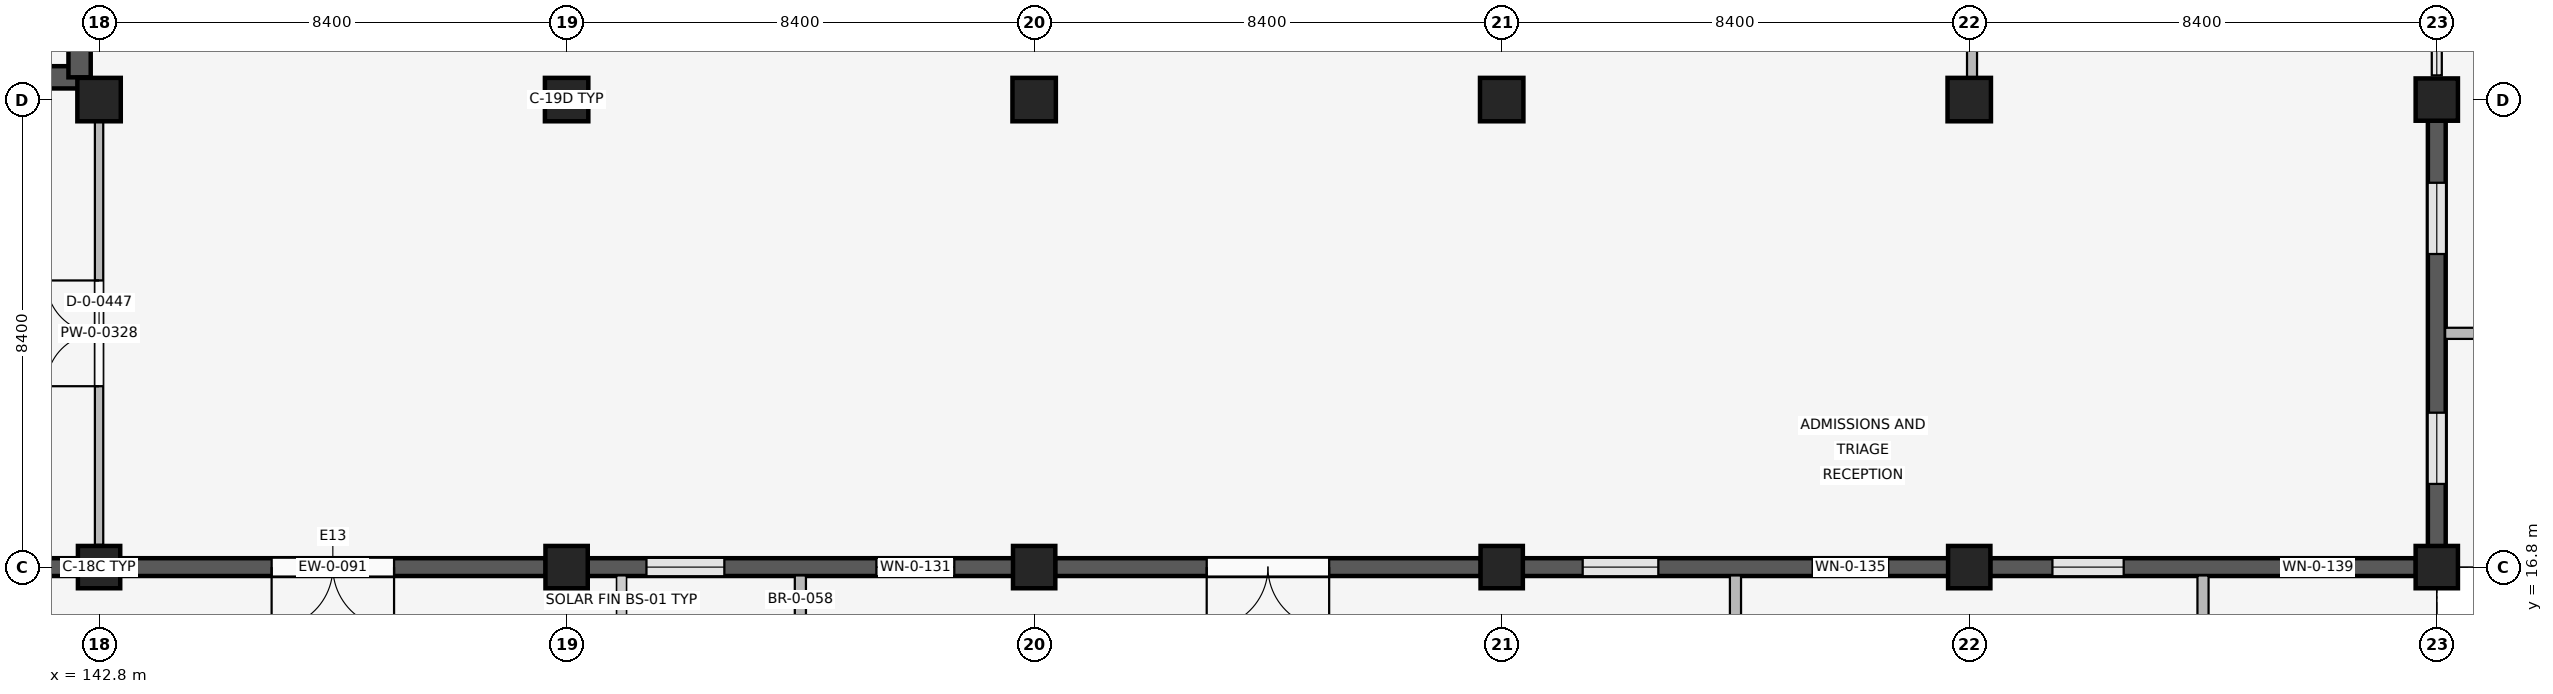
"""IFC4 building model, lengths in metres.
Left out: names, types, materials, properties, quantities, classifications, styles, units other than length and angle.
Written with IfcOpenShell. Run it as: python <this file> out.ifc"""

import sys

from ifc_helpers import new_model, si_unit, direction, frame, frame_2d, origin, origin_2d, place, context, subcontext, project, spatial, rectangle, extrude, element, fill, save


model = new_model("IFC4")
c1 = context("Model", 3, precision=1e-05, world=origin(), true_north=direction((0.0, 1.0)))
c2 = subcontext(c1, "Body", "Model", "MODEL_VIEW")
j1 = project(units=[si_unit("LENGTHUNIT", "METRE"), si_unit("PLANEANGLEUNIT", "RADIAN")], contexts=[c1])
p1 = place(None, origin())
s1 = spatial("IfcSite", under=j1, at=p1, CompositionType="ELEMENT")
p2 = place(p1, origin())
s2 = spatial("IfcBuilding", under=s1, at=p2, CompositionType="ELEMENT")
p3 = place(p2, origin())
s3 = spatial("IfcBuildingStorey", under=s2, at=p3, CompositionType="ELEMENT", Elevation=0.0)
p4 = place(p3, frame((142.8, 16.8, 0.0), z_axis=(0.0, 0.0, 1.0), x_axis=(1.0, 0.0, 0.0)))
e1 = element("IfcColumn", 1, at=p4, inside=s3, PredefinedType="COLUMN", context=c2, shape_type="SweptSolid", body=[
    extrude(rectangle(XDim=0.76, YDim=0.76, at=origin_2d()), origin(), (0.0, 0.0, 1.0), 4.8),
])
p5 = place(p3, frame((142.8, 25.2, 0.0), z_axis=(0.0, 0.0, 1.0), x_axis=(1.0, 0.0, 0.0)))
e2 = element("IfcColumn", 2, at=p5, inside=s3, PredefinedType="COLUMN", context=c2, shape_type="SweptSolid", body=[
    extrude(rectangle(XDim=0.78, YDim=0.78, at=origin_2d()), origin(), (0.0, 0.0, 1.0), 4.8),
])
p6 = place(p3, frame((151.2, 16.8, 0.0), z_axis=(0.0, 0.0, 1.0), x_axis=(1.0, 0.0, 0.0)))
e3 = element("IfcColumn", 3, at=p6, inside=s3, PredefinedType="COLUMN", context=c2, shape_type="SweptSolid", body=[
    extrude(rectangle(XDim=0.76, YDim=0.76, at=origin_2d()), origin(), (0.0, 0.0, 1.0), 4.8),
])
p7 = place(p3, frame((151.2, 25.2, 0.0), z_axis=(0.0, 0.0, 1.0), x_axis=(1.0, 0.0, 0.0)))
e4 = element("IfcColumn", 4, at=p7, inside=s3, PredefinedType="COLUMN", context=c2, shape_type="SweptSolid", body=[
    extrude(rectangle(XDim=0.78, YDim=0.78, at=origin_2d()), origin(), (0.0, 0.0, 1.0), 4.8),
])
p8 = place(p3, frame((159.6, 16.8, 0.0), z_axis=(0.0, 0.0, 1.0), x_axis=(1.0, 0.0, 0.0)))
e5 = element("IfcColumn", 5, at=p8, inside=s3, PredefinedType="COLUMN", context=c2, shape_type="SweptSolid", body=[
    extrude(rectangle(XDim=0.76, YDim=0.76, at=origin_2d()), origin(), (0.0, 0.0, 1.0), 4.8),
])
p9 = place(p3, frame((159.6, 25.2, 0.0), z_axis=(0.0, 0.0, 1.0), x_axis=(1.0, 0.0, 0.0)))
e6 = element("IfcColumn", 6, at=p9, inside=s3, PredefinedType="COLUMN", context=c2, shape_type="SweptSolid", body=[
    extrude(rectangle(XDim=0.78, YDim=0.78, at=origin_2d()), origin(), (0.0, 0.0, 1.0), 4.8),
])
p10 = place(p3, frame((168.0, 16.8, 0.0), z_axis=(0.0, 0.0, 1.0), x_axis=(1.0, 0.0, 0.0)))
e7 = element("IfcColumn", 7, at=p10, inside=s3, PredefinedType="COLUMN", context=c2, shape_type="SweptSolid", body=[
    extrude(rectangle(XDim=0.76, YDim=0.76, at=origin_2d()), origin(), (0.0, 0.0, 1.0), 4.8),
])
p11 = place(p3, frame((168.0, 25.2, 0.0), z_axis=(0.0, 0.0, 1.0), x_axis=(1.0, 0.0, 0.0)))
e8 = element("IfcColumn", 8, at=p11, inside=s3, PredefinedType="COLUMN", context=c2, shape_type="SweptSolid", body=[
    extrude(rectangle(XDim=0.78, YDim=0.78, at=origin_2d()), origin(), (0.0, 0.0, 1.0), 4.8),
])
p12 = place(p3, frame((176.4, 16.8, 0.0), z_axis=(0.0, 0.0, 1.0), x_axis=(1.0, 0.0, 0.0)))
e9 = element("IfcColumn", 9, at=p12, inside=s3, PredefinedType="COLUMN", context=c2, shape_type="SweptSolid", body=[
    extrude(rectangle(XDim=0.76, YDim=0.76, at=origin_2d()), origin(), (0.0, 0.0, 1.0), 4.8),
])
p13 = place(p3, frame((176.4, 25.2, 0.0), z_axis=(0.0, 0.0, 1.0), x_axis=(1.0, 0.0, 0.0)))
e10 = element("IfcColumn", 10, at=p13, inside=s3, PredefinedType="COLUMN", context=c2, shape_type="SweptSolid", body=[
    extrude(rectangle(XDim=0.78, YDim=0.78, at=origin_2d()), origin(), (0.0, 0.0, 1.0), 4.8),
])
for number, where, z_axis, x_axis in (
    (11, (184.8, 16.8, 0.0), (0.0, 0.0, 1.0), (1.0, 0.0, 0.0)),
    (12, (184.8, 25.2, 0.0), (0.0, 0.0, 1.0), (1.0, 0.0, 0.0)),
):
    element("IfcColumn", number, at=place(p3, frame(where, z_axis=z_axis, x_axis=x_axis)), inside=s3, PredefinedType="COLUMN", context=c2, shape_type="SweptSolid", body=[
        extrude(rectangle(XDim=0.76, YDim=0.76, at=origin_2d()), origin(), (0.0, 0.0, 1.0), 4.8),
    ])
p14 = place(p3, frame((142.425, 16.8, 0.0), z_axis=(0.0, 0.0, 1.0), x_axis=(-1.0, 0.0, 0.0)))
e13 = element("IfcWall", 13, at=p14, inside=s3, PredefinedType="SOLIDWALL", context=c2, shape_type="SweptSolid", body=[
    extrude(rectangle(XDim=7.65, YDim=0.32, at=frame_2d((3.825, 0.0))), origin(), (0.0, 0.0, 1.0), 3.82),
])
p15 = place(p14, frame((6.0, 0.0, 0.0)))
e14 = element("IfcOpeningElement", 14, at=p15, cuts=e13, PredefinedType="OPENING", context=c2, shape_type="SweptSolid", body=[
    extrude(rectangle(XDim=1.2, YDim=2.25, at=frame_2d((0.6, 1.125))), frame((0.0, 0.17, 0.0), z_axis=(0.0, -1.0, 0.0), x_axis=(1.0, 0.0, 0.0)), (0.0, 0.0, 1.0), 0.34),
])
p16 = place(p14, frame((1.129, 0.0, 0.85)))
e15 = element("IfcOpeningElement", 15, at=p16, cuts=e13, PredefinedType="OPENING", context=c2, shape_type="SweptSolid", body=[
    extrude(rectangle(XDim=1.26, YDim=1.52, at=frame_2d((0.63, 0.76))), frame((0.0, 0.17, 0.0), z_axis=(0.0, -1.0, 0.0), x_axis=(1.0, 0.0, 0.0)), (0.0, 0.0, 1.0), 0.34),
])
p17 = place(p14, frame((4.3, 0.0, 0.85)))
e16 = element("IfcOpeningElement", 16, at=p17, cuts=e13, PredefinedType="OPENING", context=c2, shape_type="SweptSolid", body=[
    extrude(rectangle(XDim=1.26, YDim=1.52, at=frame_2d((0.63, 0.76))), frame((0.0, 0.17, 0.0), z_axis=(0.0, -1.0, 0.0), x_axis=(1.0, 0.0, 0.0)), (0.0, 0.0, 1.0), 0.34),
])
p18 = place(p3, frame((150.825, 16.8, 0.0), z_axis=(0.0, 0.0, 1.0), x_axis=(-1.0, 0.0, 0.0)))
e17 = element("IfcWall", 17, at=p18, inside=s3, PredefinedType="SOLIDWALL", context=c2, shape_type="SweptSolid", body=[
    extrude(rectangle(XDim=7.65, YDim=0.32, at=frame_2d((3.825, 0.0))), origin(), (0.0, 0.0, 1.0), 3.82),
])
p19 = place(p18, frame((2.725, 0.0, 0.0)))
e18 = element("IfcOpeningElement", 18, at=p19, cuts=e17, PredefinedType="OPENING", context=c2, shape_type="SweptSolid", body=[
    extrude(rectangle(XDim=2.2, YDim=2.55, at=frame_2d((1.1, 1.275))), frame((0.0, 0.17, 0.0), z_axis=(0.0, -1.0, 0.0), x_axis=(1.0, 0.0, 0.0)), (0.0, 0.0, 1.0), 0.34),
])
p20 = place(p3, frame((159.225, 16.8, 0.0), z_axis=(0.0, 0.0, 1.0), x_axis=(-1.0, 0.0, 0.0)))
e19 = element("IfcWall", 19, at=p20, inside=s3, PredefinedType="SOLIDWALL", context=c2, shape_type="SweptSolid", body=[
    extrude(rectangle(XDim=7.65, YDim=0.32, at=frame_2d((3.825, 0.0))), origin(), (0.0, 0.0, 1.0), 3.82),
])
p21 = place(p20, frame((1.06, 0.0, 0.85)))
e20 = element("IfcOpeningElement", 20, at=p21, cuts=e19, PredefinedType="OPENING", context=c2, shape_type="SweptSolid", body=[
    extrude(rectangle(XDim=1.4, YDim=1.4, at=frame_2d((0.7, 0.7))), frame((0.0, 0.17, 0.0), z_axis=(0.0, -1.0, 0.0), x_axis=(1.0, 0.0, 0.0)), (0.0, 0.0, 1.0), 0.34),
])
p22 = place(p20, frame((5.19, 0.0, 0.85)))
e21 = element("IfcOpeningElement", 21, at=p22, cuts=e19, PredefinedType="OPENING", context=c2, shape_type="SweptSolid", body=[
    extrude(rectangle(XDim=1.4, YDim=1.4, at=frame_2d((0.7, 0.7))), frame((0.0, 0.17, 0.0), z_axis=(0.0, -1.0, 0.0), x_axis=(1.0, 0.0, 0.0)), (0.0, 0.0, 1.0), 0.34),
])
p23 = place(p3, frame((155.4, 16.65, 0.0), z_axis=(0.0, 0.0, 1.0), x_axis=(0.0, -1.0, 0.0)))
e22 = element("IfcWall", 22, at=p23, inside=s3, PredefinedType="ELEMENTEDWALL", context=c2, shape_type="SweptSolid", body=[
    extrude(rectangle(XDim=0.85, YDim=0.2, at=frame_2d((0.425, 0.0))), origin(), (0.0, 0.0, 1.0), 3.8),
])
p24 = place(p3, frame((167.625, 16.8, 0.0), z_axis=(0.0, 0.0, 1.0), x_axis=(-1.0, 0.0, 0.0)))
e23 = element("IfcWall", 23, at=p24, inside=s3, PredefinedType="SOLIDWALL", context=c2, shape_type="SweptSolid", body=[
    extrude(rectangle(XDim=7.65, YDim=0.32, at=frame_2d((3.825, 0.0))), origin(), (0.0, 0.0, 1.0), 3.82),
])
p25 = place(p24, frame((2.725, 0.0, 0.0)))
e24 = element("IfcOpeningElement", 24, at=p25, cuts=e23, PredefinedType="OPENING", context=c2, shape_type="SweptSolid", body=[
    extrude(rectangle(XDim=2.2, YDim=2.55, at=frame_2d((1.1, 1.275))), frame((0.0, 0.17, 0.0), z_axis=(0.0, -1.0, 0.0), x_axis=(1.0, 0.0, 0.0)), (0.0, 0.0, 1.0), 0.34),
])
p26 = place(p3, frame((176.025, 16.8, 0.0), z_axis=(0.0, 0.0, 1.0), x_axis=(-1.0, 0.0, 0.0)))
e25 = element("IfcWall", 25, at=p26, inside=s3, PredefinedType="SOLIDWALL", context=c2, shape_type="SweptSolid", body=[
    extrude(rectangle(XDim=7.65, YDim=0.32, at=frame_2d((3.825, 0.0))), origin(), (0.0, 0.0, 1.0), 3.82),
])
p27 = place(p26, frame((1.08, 0.0, 0.85)))
e26 = element("IfcOpeningElement", 26, at=p27, cuts=e25, PredefinedType="OPENING", context=c2, shape_type="SweptSolid", body=[
    extrude(rectangle(XDim=1.36, YDim=1.42, at=frame_2d((0.68, 0.71))), frame((0.0, 0.17, 0.0), z_axis=(0.0, -1.0, 0.0), x_axis=(1.0, 0.0, 0.0)), (0.0, 0.0, 1.0), 0.34),
])
p28 = place(p26, frame((5.21, 0.0, 0.85)))
e27 = element("IfcOpeningElement", 27, at=p28, cuts=e25, PredefinedType="OPENING", context=c2, shape_type="SweptSolid", body=[
    extrude(rectangle(XDim=1.36, YDim=1.42, at=frame_2d((0.68, 0.71))), frame((0.0, 0.17, 0.0), z_axis=(0.0, -1.0, 0.0), x_axis=(1.0, 0.0, 0.0)), (0.0, 0.0, 1.0), 0.34),
])
p29 = place(p3, frame((172.2, 16.65, 0.0), z_axis=(0.0, 0.0, 1.0), x_axis=(0.0, -1.0, 0.0)))
e28 = element("IfcWall", 28, at=p29, inside=s3, PredefinedType="ELEMENTEDWALL", context=c2, shape_type="SweptSolid", body=[
    extrude(rectangle(XDim=0.85, YDim=0.2, at=frame_2d((0.425, 0.0))), origin(), (0.0, 0.0, 1.0), 3.8),
])
p30 = place(p3, frame((184.425, 16.8, 0.0), z_axis=(0.0, 0.0, 1.0), x_axis=(-1.0, 0.0, 0.0)))
e29 = element("IfcWall", 29, at=p30, inside=s3, PredefinedType="SOLIDWALL", context=c2, shape_type="SweptSolid", body=[
    extrude(rectangle(XDim=7.65, YDim=0.32, at=frame_2d((3.825, 0.0))), origin(), (0.0, 0.0, 1.0), 3.82),
])
p31 = place(p30, frame((1.119, 0.0, 0.85)))
e30 = element("IfcOpeningElement", 30, at=p31, cuts=e29, PredefinedType="OPENING", context=c2, shape_type="SweptSolid", body=[
    extrude(rectangle(XDim=1.28, YDim=1.38, at=frame_2d((0.64, 0.69))), frame((0.0, 0.17, 0.0), z_axis=(0.0, -1.0, 0.0), x_axis=(1.0, 0.0, 0.0)), (0.0, 0.0, 1.0), 0.34),
])
p32 = place(p30, frame((5.25, 0.0, 0.85)))
e31 = element("IfcOpeningElement", 31, at=p32, cuts=e29, PredefinedType="OPENING", context=c2, shape_type="SweptSolid", body=[
    extrude(rectangle(XDim=1.28, YDim=1.38, at=frame_2d((0.64, 0.69))), frame((0.0, 0.17, 0.0), z_axis=(0.0, -1.0, 0.0), x_axis=(1.0, 0.0, 0.0)), (0.0, 0.0, 1.0), 0.34),
])
p33 = place(p3, frame((180.6, 16.65, 0.0), z_axis=(0.0, 0.0, 1.0), x_axis=(0.0, -1.0, 0.0)))
e32 = element("IfcWall", 32, at=p33, inside=s3, PredefinedType="ELEMENTEDWALL", context=c2, shape_type="SweptSolid", body=[
    extrude(rectangle(XDim=0.85, YDim=0.2, at=frame_2d((0.425, 0.0))), origin(), (0.0, 0.0, 1.0), 3.8),
])
p34 = place(p3, frame((184.8, 24.825, 0.0), z_axis=(0.0, 0.0, 1.0), x_axis=(0.0, -1.0, 0.0)))
e33 = element("IfcWall", 33, at=p34, inside=s3, PredefinedType="SOLIDWALL", context=c2, shape_type="SweptSolid", body=[
    extrude(rectangle(XDim=7.65, YDim=0.32, at=frame_2d((3.825, 0.0))), origin(), (0.0, 0.0, 1.0), 3.82),
])
p35 = place(p34, frame((1.119, 0.0, 0.85)))
e34 = element("IfcOpeningElement", 34, at=p35, cuts=e33, PredefinedType="OPENING", context=c2, shape_type="SweptSolid", body=[
    extrude(rectangle(XDim=1.28, YDim=1.38, at=frame_2d((0.64, 0.69))), frame((0.0, 0.17, 0.0), z_axis=(0.0, -1.0, 0.0), x_axis=(1.0, 0.0, 0.0)), (0.0, 0.0, 1.0), 0.34),
])
p36 = place(p34, frame((5.25, 0.0, 0.85)))
e35 = element("IfcOpeningElement", 35, at=p36, cuts=e33, PredefinedType="OPENING", context=c2, shape_type="SweptSolid", body=[
    extrude(rectangle(XDim=1.28, YDim=1.38, at=frame_2d((0.64, 0.69))), frame((0.0, 0.17, 0.0), z_axis=(0.0, -1.0, 0.0), x_axis=(1.0, 0.0, 0.0)), (0.0, 0.0, 1.0), 0.34),
])
p37 = place(p3, frame((184.95, 21.0, 0.0), z_axis=(0.0, 0.0, 1.0), x_axis=(1.0, 0.0, 0.0)))
e36 = element("IfcWall", 36, at=p37, inside=s3, PredefinedType="ELEMENTEDWALL", context=c2, shape_type="SweptSolid", body=[
    extrude(rectangle(XDim=0.85, YDim=0.2, at=frame_2d((0.425, 0.0))), origin(), (0.0, 0.0, 1.0), 3.8),
])
p38 = place(p3, frame((134.95, 25.6, 0.0), z_axis=(0.0, 0.0, 1.0), x_axis=(1.0, 0.0, 0.0)))
e37 = element("IfcWall", 37, at=p38, inside=s3, PredefinedType="SHEAR", context=c2, shape_type="SweptSolid", body=[
    extrude(rectangle(XDim=7.5, YDim=0.4, at=frame_2d((3.75, 0.0))), origin(), (0.0, 0.0, 1.0), 4.52),
])
p39 = place(p38, frame((4.85, 0.0, 0.0)))
e38 = element("IfcOpeningElement", 38, at=p39, cuts=e37, PredefinedType="OPENING", context=c2, shape_type="SweptSolid", body=[
    extrude(rectangle(XDim=1.2, YDim=2.2, at=frame_2d((0.6, 1.1))), frame((0.0, 0.21, 0.0), z_axis=(0.0, -1.0, 0.0), x_axis=(1.0, 0.0, 0.0)), (0.0, 0.0, 1.0), 0.42),
])
p40 = place(p38, frame((0.22, 0.0, 0.0)))
e39 = element("IfcOpeningElement", 39, at=p40, cuts=e37, PredefinedType="OPENING", context=c2, shape_type="SweptSolid", body=[
    extrude(rectangle(XDim=1.2, YDim=2.2, at=frame_2d((0.6, 1.1))), frame((0.0, 0.21, 0.0), z_axis=(0.0, -1.0, 0.0), x_axis=(1.0, 0.0, 0.0)), (0.0, 0.0, 1.0), 0.42),
])
p41 = place(p3, frame((142.45, 25.6, 0.0), z_axis=(0.0, 0.0, 1.0), x_axis=(0.0, 1.0, 0.0)))
e40 = element("IfcWall", 40, at=p41, inside=s3, PredefinedType="SHEAR", context=c2, shape_type="SweptSolid", body=[
    extrude(rectangle(XDim=7.55, YDim=0.4, at=frame_2d((3.775, 0.0))), origin(), (0.0, 0.0, 1.0), 4.52),
])
p42 = place(p3, frame((142.8, 17.2, 0.0), z_axis=(0.0, 0.0, 1.0), x_axis=(0.0, 1.0, 0.0)))
e41 = element("IfcWall", 41, at=p42, inside=s3, PredefinedType="PARTITIONING", context=c2, shape_type="SweptSolid", body=[
    extrude(rectangle(XDim=7.6, YDim=0.15, at=frame_2d((3.8, 0.0))), origin(), (0.0, 0.0, 1.0), 3.8),
])
p43 = place(p42, frame((2.85, 0.0, 0.0)))
e42 = element("IfcOpeningElement", 42, at=p43, cuts=e41, PredefinedType="OPENING", context=c2, shape_type="SweptSolid", body=[
    extrude(rectangle(XDim=1.9, YDim=2.4, at=frame_2d((0.95, 1.2))), frame((0.0, 0.085, 0.0), z_axis=(0.0, -1.0, 0.0), x_axis=(1.0, 0.0, 0.0)), (0.0, 0.0, 1.0), 0.17),
])
p44 = place(p3, frame((176.45, 25.6, 0.0), z_axis=(0.0, 0.0, 1.0), x_axis=(0.0, 1.0, 0.0)))
e43 = element("IfcWall", 43, at=p44, inside=s3, PredefinedType="PARTITIONING", context=c2, shape_type="SweptSolid", body=[
    extrude(rectangle(XDim=6.2, YDim=0.18, at=frame_2d((3.1, 0.0))), origin(), (0.0, 0.0, 1.0), 3.8),
])
p45 = place(p44, frame((2.5, 0.0, 0.0)))
e44 = element("IfcOpeningElement", 44, at=p45, cuts=e43, PredefinedType="OPENING", context=c2, shape_type="SweptSolid", body=[
    extrude(rectangle(XDim=1.2, YDim=2.2, at=frame_2d((0.6, 1.1))), frame((0.0, 0.1, 0.0), z_axis=(0.0, -1.0, 0.0), x_axis=(1.0, 0.0, 0.0)), (0.0, 0.0, 1.0), 0.2),
])
p46 = place(p19, origin())
e45 = element("IfcDoor", 45, at=p46, inside=s3, OperationType="DOUBLE_SWING_LEFT", PredefinedType="DOOR", context=c2, shape_type="SweptSolid", body=[
    extrude(rectangle(XDim=2.2, YDim=2.55, at=frame_2d((1.1, 1.275))), frame((0.0, 0.025, 0.0), z_axis=(0.0, -1.0, 0.0), x_axis=(1.0, 0.0, 0.0)), (0.0, 0.0, 1.0), 0.05),
])
fill(e18, e45)
p47 = place(p21, origin())
e46 = element("IfcWindow", 46, at=p47, inside=s3, PartitioningType="SINGLE_PANEL", PredefinedType="WINDOW", context=c2, shape_type="SweptSolid", body=[
    extrude(rectangle(XDim=1.4, YDim=1.4, at=frame_2d((0.7, 0.7))), frame((0.0, 0.03, 0.0), z_axis=(0.0, -1.0, 0.0), x_axis=(1.0, 0.0, 0.0)), (0.0, 0.0, 1.0), 0.06),
])
fill(e20, e46)
p48 = place(p22, origin())
e47 = element("IfcWindow", 47, at=p48, inside=s3, PartitioningType="SINGLE_PANEL", PredefinedType="WINDOW", context=c2, shape_type="SweptSolid", body=[
    extrude(rectangle(XDim=1.4, YDim=1.4, at=frame_2d((0.7, 0.7))), frame((0.0, 0.03, 0.0), z_axis=(0.0, -1.0, 0.0), x_axis=(1.0, 0.0, 0.0)), (0.0, 0.0, 1.0), 0.06),
])
fill(e21, e47)
p49 = place(p25, origin())
e48 = element("IfcDoor", 48, at=p49, inside=s3, OperationType="DOUBLE_SWING_LEFT", PredefinedType="DOOR", context=c2, shape_type="SweptSolid", body=[
    extrude(rectangle(XDim=2.2, YDim=2.55, at=frame_2d((1.1, 1.275))), frame((0.0, 0.025, 0.0), z_axis=(0.0, -1.0, 0.0), x_axis=(1.0, 0.0, 0.0)), (0.0, 0.0, 1.0), 0.05),
])
fill(e24, e48)
p50 = place(p27, origin())
e49 = element("IfcWindow", 49, at=p50, inside=s3, PartitioningType="SINGLE_PANEL", PredefinedType="WINDOW", context=c2, shape_type="SweptSolid", body=[
    extrude(rectangle(XDim=1.36, YDim=1.42, at=frame_2d((0.68, 0.71))), frame((0.0, 0.03, 0.0), z_axis=(0.0, -1.0, 0.0), x_axis=(1.0, 0.0, 0.0)), (0.0, 0.0, 1.0), 0.06),
])
fill(e26, e49)
p51 = place(p28, origin())
e50 = element("IfcWindow", 50, at=p51, inside=s3, PartitioningType="SINGLE_PANEL", PredefinedType="WINDOW", context=c2, shape_type="SweptSolid", body=[
    extrude(rectangle(XDim=1.36, YDim=1.42, at=frame_2d((0.68, 0.71))), frame((0.0, 0.03, 0.0), z_axis=(0.0, -1.0, 0.0), x_axis=(1.0, 0.0, 0.0)), (0.0, 0.0, 1.0), 0.06),
])
fill(e27, e50)
p52 = place(p31, origin())
e51 = element("IfcWindow", 51, at=p52, inside=s3, PartitioningType="SINGLE_PANEL", PredefinedType="WINDOW", context=c2, shape_type="SweptSolid", body=[
    extrude(rectangle(XDim=1.28, YDim=1.38, at=frame_2d((0.64, 0.69))), frame((0.0, 0.03, 0.0), z_axis=(0.0, -1.0, 0.0), x_axis=(1.0, 0.0, 0.0)), (0.0, 0.0, 1.0), 0.06),
])
fill(e30, e51)
p53 = place(p32, origin())
e52 = element("IfcWindow", 52, at=p53, inside=s3, PartitioningType="SINGLE_PANEL", PredefinedType="WINDOW", context=c2, shape_type="SweptSolid", body=[
    extrude(rectangle(XDim=1.28, YDim=1.38, at=frame_2d((0.64, 0.69))), frame((0.0, 0.03, 0.0), z_axis=(0.0, -1.0, 0.0), x_axis=(1.0, 0.0, 0.0)), (0.0, 0.0, 1.0), 0.06),
])
fill(e31, e52)
p54 = place(p35, origin())
e53 = element("IfcWindow", 53, at=p54, inside=s3, PartitioningType="SINGLE_PANEL", PredefinedType="WINDOW", context=c2, shape_type="SweptSolid", body=[
    extrude(rectangle(XDim=1.28, YDim=1.38, at=frame_2d((0.64, 0.69))), frame((0.0, 0.03, 0.0), z_axis=(0.0, -1.0, 0.0), x_axis=(1.0, 0.0, 0.0)), (0.0, 0.0, 1.0), 0.06),
])
fill(e34, e53)
p55 = place(p36, origin())
e54 = element("IfcWindow", 54, at=p55, inside=s3, PartitioningType="SINGLE_PANEL", PredefinedType="WINDOW", context=c2, shape_type="SweptSolid", body=[
    extrude(rectangle(XDim=1.28, YDim=1.38, at=frame_2d((0.64, 0.69))), frame((0.0, 0.03, 0.0), z_axis=(0.0, -1.0, 0.0), x_axis=(1.0, 0.0, 0.0)), (0.0, 0.0, 1.0), 0.06),
])
fill(e35, e54)
p56 = place(p43, origin())
e55 = element("IfcDoor", 55, at=p56, inside=s3, OperationType="DOUBLE_SWING_LEFT", PredefinedType="DOOR", context=c2, shape_type="SweptSolid", body=[
    extrude(rectangle(XDim=1.9, YDim=2.4, at=frame_2d((0.95, 1.2))), frame((0.0, 0.025, 0.0), z_axis=(0.0, -1.0, 0.0), x_axis=(1.0, 0.0, 0.0)), (0.0, 0.0, 1.0), 0.05),
])
fill(e42, e55)
save(model, sys.argv[1])
